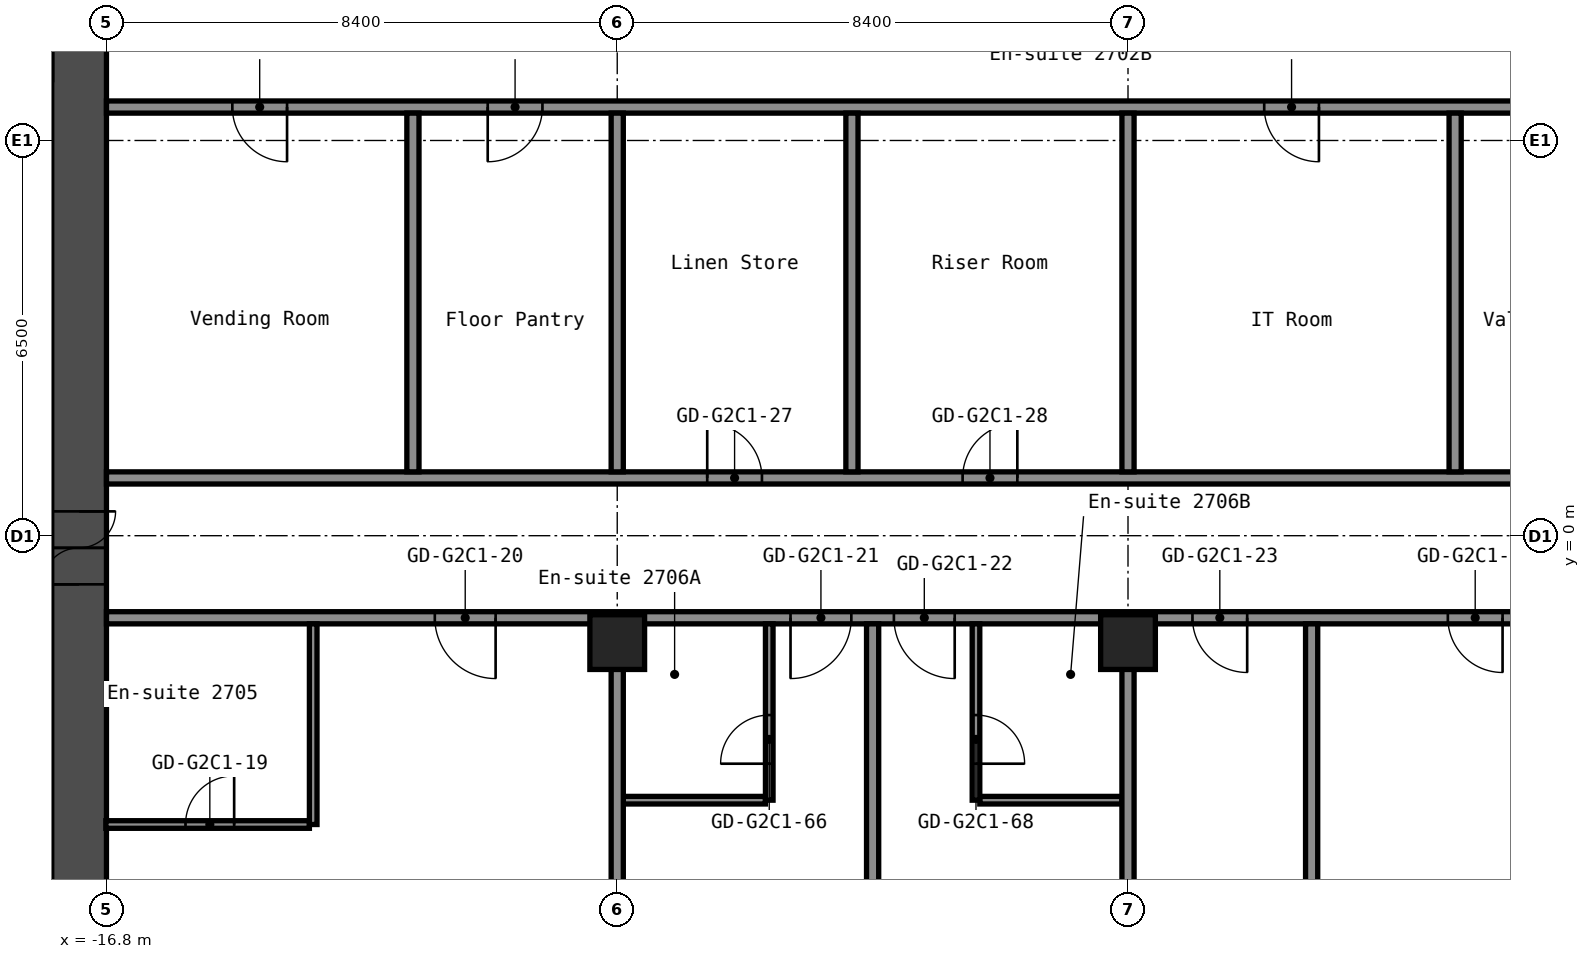
"""IFC4 building model, lengths in metres.
Left out: names, types, materials, properties, quantities, classifications, styles, units other than length and angle.
Written with IfcOpenShell. Run it as: python <this file> out.ifc"""

import sys

from ifc_helpers import new_model, si_unit, direction, frame, frame_2d, origin, origin_2d, place, context, subcontext, project, spatial, rectangle, hollow_rectangle, extrude, element, fill, save


model = new_model("IFC4")
c1 = context("Model", 3, precision=1e-05, world=origin(), true_north=direction((0.0, 1.0)))
c2 = subcontext(c1, "Body", "Model", "MODEL_VIEW")
j1 = project(units=[si_unit("LENGTHUNIT", "METRE"), si_unit("PLANEANGLEUNIT", "RADIAN")], contexts=[c1])
p1 = place(None, origin())
s1 = spatial("IfcSite", under=j1, at=p1, CompositionType="ELEMENT")
p2 = place(p1, origin())
s2 = spatial("IfcBuilding", under=s1, at=p2, CompositionType="ELEMENT")
p3 = place(p2, frame((0.0, 0.0, 97.8)))
s3 = spatial("IfcBuildingStorey", under=s2, at=p3, CompositionType="ELEMENT", Elevation=97.8)
for number, where, z_axis, x_axis in (
    (1, (-8.4, -1.75, 0.0), (0.0, 0.0, 1.0), (1.0, 0.0, 0.0)),
    (2, (0.0, -1.75, 0.0), (0.0, 0.0, 1.0), (1.0, 0.0, 0.0)),
):
    element("IfcColumn", number, at=place(p3, frame(where, z_axis=z_axis, x_axis=x_axis)), inside=s3, PredefinedType="COLUMN", context=c2, shape_type="SweptSolid", body=[
        extrude(hollow_rectangle(XDim=0.9, YDim=0.9, WallThickness=0.036, at=origin_2d()), origin(), (0.0, 0.0, 1.0), 2.8),
    ])
p4 = place(p3, frame((-17.25, -8.4, 0.0), z_axis=(0.0, 0.0, 1.0), x_axis=(0.0, 1.0, 0.0)))
e3 = element("IfcWall", 3, at=p4, inside=s3, PredefinedType="SHEAR", context=c2, shape_type="SweptSolid", body=[
    extrude(rectangle(XDim=16.8, YDim=0.9, at=frame_2d((8.4, 0.0))), origin(), (0.0, 0.0, 1.0), 2.8),
])
p5 = place(p4, frame((7.6, 0.0, 0.0)))
e4 = element("IfcOpeningElement", 4, at=p5, cuts=e3, PredefinedType="OPENING", context=c2, shape_type="SweptSolid", body=[
    extrude(rectangle(XDim=1.2, YDim=2.1, at=frame_2d((0.6, 1.05))), frame((0.0, 0.46, 0.0), z_axis=(0.0, -1.0, 0.0), x_axis=(1.0, 0.0, 0.0)), (0.0, 0.0, 1.0), 0.92),
])
p6 = place(p3, frame((-32.7, 7.95, 0.0), z_axis=(0.0, 0.0, 1.0), x_axis=(1.0, 0.0, 0.0)))
e5 = element("IfcWall", 5, at=p6, inside=s3, PredefinedType="SHEAR", context=c2, shape_type="SweptSolid", body=[
    extrude(rectangle(XDim=15.0, YDim=0.9, at=frame_2d((7.5, 0.0))), origin(), (0.0, 0.0, 1.0), 2.8),
])
p7 = place(p6, frame((3.4, 0.0, 0.0)))
e6 = element("IfcOpeningElement", 6, at=p7, cuts=e5, PredefinedType="OPENING", context=c2, shape_type="SweptSolid", body=[
    extrude(rectangle(XDim=1.2, YDim=2.1, at=frame_2d((0.6, 1.05))), frame((0.0, 0.46, 0.0), z_axis=(0.0, -1.0, 0.0), x_axis=(1.0, 0.0, 0.0)), (0.0, 0.0, 1.0), 0.92),
])
p8 = place(p6, frame((0.75, 0.0, 0.0)))
e7 = element("IfcOpeningElement", 7, at=p8, cuts=e5, PredefinedType="OPENING", context=c2, shape_type="SweptSolid", body=[
    extrude(rectangle(XDim=0.9, YDim=2.1, at=frame_2d((0.45, 1.05))), frame((0.0, 0.46, 0.0), z_axis=(0.0, -1.0, 0.0), x_axis=(1.0, 0.0, 0.0)), (0.0, 0.0, 1.0), 0.92),
])
p9 = place(p3, frame((-16.81, -4.75, 0.0), z_axis=(0.0, 0.0, 1.0), x_axis=(1.0, 0.0, 0.0)))
e8 = element("IfcWall", 8, at=p9, inside=s3, PredefinedType="PARTITIONING", context=c2, shape_type="SweptSolid", body=[
    extrude(rectangle(XDim=3.348, YDim=0.125, at=frame_2d((1.674, 0.0))), origin(), (0.0, 0.0, 1.0), 2.8),
])
p10 = place(p9, frame((1.31, 0.0, 0.0)))
e9 = element("IfcOpeningElement", 9, at=p10, cuts=e8, PredefinedType="OPENING", context=c2, shape_type="SweptSolid", body=[
    extrude(rectangle(XDim=0.8, YDim=2.1, at=frame_2d((0.4, 1.05))), frame((0.0, 0.073, 0.0), z_axis=(0.0, -1.0, 0.0), x_axis=(1.0, 0.0, 0.0)), (0.0, 0.0, 1.0), 0.145),
])
p11 = place(p3, frame((-8.3, -4.35, 0.0), z_axis=(0.0, 0.0, 1.0), x_axis=(1.0, 0.0, 0.0)))
e10 = element("IfcWall", 10, at=p11, inside=s3, PredefinedType="PARTITIONING", context=c2, shape_type="SweptSolid", body=[
    extrude(rectangle(XDim=2.338, YDim=0.125, at=frame_2d((1.169, 0.0))), origin(), (0.0, 0.0, 1.0), 2.8),
])
p12 = place(p3, frame((-2.438, -4.35, 0.0), z_axis=(0.0, 0.0, 1.0), x_axis=(1.0, 0.0, 0.0)))
e11 = element("IfcWall", 11, at=p12, inside=s3, PredefinedType="PARTITIONING", context=c2, shape_type="SweptSolid", body=[
    extrude(rectangle(XDim=2.337, YDim=0.125, at=frame_2d((1.169, 0.0))), origin(), (0.0, 0.0, 1.0), 2.8),
])
p13 = place(p3, frame((-16.8, -1.35, 0.0), z_axis=(0.0, 0.0, 1.0), x_axis=(1.0, 0.0, 0.0)))
e12 = element("IfcWall", 12, at=p13, inside=s3, PredefinedType="PARTITIONING", context=c2, shape_type="SweptSolid", body=[
    extrude(rectangle(XDim=33.6, YDim=0.2, at=frame_2d((16.8, 0.0))), origin(), (0.0, 0.0, 1.0), 2.8),
])
p14 = place(p13, frame((5.4, 0.0, 0.0)))
e13 = element("IfcOpeningElement", 13, at=p14, cuts=e12, PredefinedType="OPENING", context=c2, shape_type="SweptSolid", body=[
    extrude(rectangle(XDim=1.0, YDim=2.1, at=frame_2d((0.5, 1.05))), frame((0.0, 0.11, 0.0), z_axis=(0.0, -1.0, 0.0), x_axis=(1.0, 0.0, 0.0)), (0.0, 0.0, 1.0), 0.22),
])
p15 = place(p13, frame((11.25, 0.0, 0.0)))
e14 = element("IfcOpeningElement", 14, at=p15, cuts=e12, PredefinedType="OPENING", context=c2, shape_type="SweptSolid", body=[
    extrude(rectangle(XDim=1.0, YDim=2.1, at=frame_2d((0.5, 1.05))), frame((0.0, 0.11, 0.0), z_axis=(0.0, -1.0, 0.0), x_axis=(1.0, 0.0, 0.0)), (0.0, 0.0, 1.0), 0.22),
])
p16 = place(p13, frame((12.95, 0.0, 0.0)))
e15 = element("IfcOpeningElement", 15, at=p16, cuts=e12, PredefinedType="OPENING", context=c2, shape_type="SweptSolid", body=[
    extrude(rectangle(XDim=1.0, YDim=2.1, at=frame_2d((0.5, 1.05))), frame((0.0, 0.11, 0.0), z_axis=(0.0, -1.0, 0.0), x_axis=(1.0, 0.0, 0.0)), (0.0, 0.0, 1.0), 0.22),
])
p17 = place(p13, frame((17.86, 0.0, 0.0)))
e16 = element("IfcOpeningElement", 16, at=p17, cuts=e12, PredefinedType="OPENING", context=c2, shape_type="SweptSolid", body=[
    extrude(rectangle(XDim=0.9, YDim=2.1, at=frame_2d((0.45, 1.05))), frame((0.0, 0.11, 0.0), z_axis=(0.0, -1.0, 0.0), x_axis=(1.0, 0.0, 0.0)), (0.0, 0.0, 1.0), 0.22),
])
p18 = place(p13, frame((22.06, 0.0, 0.0)))
e17 = element("IfcOpeningElement", 17, at=p18, cuts=e12, PredefinedType="OPENING", context=c2, shape_type="SweptSolid", body=[
    extrude(rectangle(XDim=0.9, YDim=2.1, at=frame_2d((0.45, 1.05))), frame((0.0, 0.11, 0.0), z_axis=(0.0, -1.0, 0.0), x_axis=(1.0, 0.0, 0.0)), (0.0, 0.0, 1.0), 0.22),
])
p19 = place(p13, frame((28.05, 0.0, 0.0)))
e18 = element("IfcOpeningElement", 18, at=p19, cuts=e12, PredefinedType="OPENING", context=c2, shape_type="SweptSolid", body=[
    extrude(rectangle(XDim=1.0, YDim=2.1, at=frame_2d((0.5, 1.05))), frame((0.0, 0.11, 0.0), z_axis=(0.0, -1.0, 0.0), x_axis=(1.0, 0.0, 0.0)), (0.0, 0.0, 1.0), 0.22),
])
p20 = place(p13, frame((29.75, 0.0, 0.0)))
e19 = element("IfcOpeningElement", 19, at=p20, cuts=e12, PredefinedType="OPENING", context=c2, shape_type="SweptSolid", body=[
    extrude(rectangle(XDim=1.0, YDim=2.1, at=frame_2d((0.5, 1.05))), frame((0.0, 0.11, 0.0), z_axis=(0.0, -1.0, 0.0), x_axis=(1.0, 0.0, 0.0)), (0.0, 0.0, 1.0), 0.22),
])
p21 = place(p3, frame((-16.8, 0.95, 0.0), z_axis=(0.0, 0.0, 1.0), x_axis=(1.0, 0.0, 0.0)))
e20 = element("IfcWall", 20, at=p21, inside=s3, PredefinedType="PARTITIONING", context=c2, shape_type="SweptSolid", body=[
    extrude(rectangle(XDim=33.6, YDim=0.2, at=frame_2d((16.8, 0.0))), origin(), (0.0, 0.0, 1.0), 2.8),
])
p22 = place(p21, frame((9.88, 0.0, 0.0)))
e21 = element("IfcOpeningElement", 21, at=p22, cuts=e20, PredefinedType="OPENING", context=c2, shape_type="SweptSolid", body=[
    extrude(rectangle(XDim=0.9, YDim=2.1, at=frame_2d((0.45, 1.05))), frame((0.0, 0.11, 0.0), z_axis=(0.0, -1.0, 0.0), x_axis=(1.0, 0.0, 0.0)), (0.0, 0.0, 1.0), 0.22),
])
p23 = place(p21, frame((14.08, 0.0, 0.0)))
e22 = element("IfcOpeningElement", 22, at=p23, cuts=e20, PredefinedType="OPENING", context=c2, shape_type="SweptSolid", body=[
    extrude(rectangle(XDim=0.9, YDim=2.1, at=frame_2d((0.45, 1.05))), frame((0.0, 0.11, 0.0), z_axis=(0.0, -1.0, 0.0), x_axis=(1.0, 0.0, 0.0)), (0.0, 0.0, 1.0), 0.22),
])
p24 = place(p21, frame((27.185, 0.0, 0.0)))
e23 = element("IfcOpeningElement", 23, at=p24, cuts=e20, PredefinedType="OPENING", context=c2, shape_type="SweptSolid", body=[
    extrude(rectangle(XDim=0.9, YDim=2.1, at=frame_2d((0.45, 1.05))), frame((0.0, 0.11, 0.0), z_axis=(0.0, -1.0, 0.0), x_axis=(1.0, 0.0, 0.0)), (0.0, 0.0, 1.0), 0.22),
])
p25 = place(p21, frame((31.385, 0.0, 0.0)))
e24 = element("IfcOpeningElement", 24, at=p25, cuts=e20, PredefinedType="OPENING", context=c2, shape_type="SweptSolid", body=[
    extrude(rectangle(XDim=0.9, YDim=2.1, at=frame_2d((0.45, 1.05))), frame((0.0, 0.11, 0.0), z_axis=(0.0, -1.0, 0.0), x_axis=(1.0, 0.0, 0.0)), (0.0, 0.0, 1.0), 0.22),
])
p26 = place(p3, frame((-16.8, 7.05, 0.0), z_axis=(0.0, 0.0, 1.0), x_axis=(1.0, 0.0, 0.0)))
e25 = element("IfcWall", 25, at=p26, inside=s3, PredefinedType="PARTITIONING", context=c2, shape_type="SweptSolid", body=[
    extrude(rectangle(XDim=33.6, YDim=0.2, at=frame_2d((16.8, 0.0))), origin(), (0.0, 0.0, 1.0), 2.8),
])
p27 = place(p26, frame((2.07, 0.0, 0.0)))
e26 = element("IfcOpeningElement", 26, at=p27, cuts=e25, PredefinedType="OPENING", context=c2, shape_type="SweptSolid", body=[
    extrude(rectangle(XDim=0.9, YDim=2.1, at=frame_2d((0.45, 1.05))), frame((0.0, 0.11, 0.0), z_axis=(0.0, -1.0, 0.0), x_axis=(1.0, 0.0, 0.0)), (0.0, 0.0, 1.0), 0.22),
])
p28 = place(p26, frame((6.27, 0.0, 0.0)))
e27 = element("IfcOpeningElement", 27, at=p28, cuts=e25, PredefinedType="OPENING", context=c2, shape_type="SweptSolid", body=[
    extrude(rectangle(XDim=0.9, YDim=2.1, at=frame_2d((0.45, 1.05))), frame((0.0, 0.11, 0.0), z_axis=(0.0, -1.0, 0.0), x_axis=(1.0, 0.0, 0.0)), (0.0, 0.0, 1.0), 0.22),
])
p29 = place(p26, frame((19.04, 0.0, 0.0)))
e28 = element("IfcOpeningElement", 28, at=p29, cuts=e25, PredefinedType="OPENING", context=c2, shape_type="SweptSolid", body=[
    extrude(rectangle(XDim=0.9, YDim=2.1, at=frame_2d((0.45, 1.05))), frame((0.0, 0.11, 0.0), z_axis=(0.0, -1.0, 0.0), x_axis=(1.0, 0.0, 0.0)), (0.0, 0.0, 1.0), 0.22),
])
p30 = place(p26, frame((23.24, 0.0, 0.0)))
e29 = element("IfcOpeningElement", 29, at=p30, cuts=e25, PredefinedType="OPENING", context=c2, shape_type="SweptSolid", body=[
    extrude(rectangle(XDim=0.9, YDim=2.1, at=frame_2d((0.45, 1.05))), frame((0.0, 0.11, 0.0), z_axis=(0.0, -1.0, 0.0), x_axis=(1.0, 0.0, 0.0)), (0.0, 0.0, 1.0), 0.22),
])
p31 = place(p3, frame((-13.4, -4.75, 0.0), z_axis=(0.0, 0.0, 1.0), x_axis=(0.0, 1.0, 0.0)))
e30 = element("IfcWall", 30, at=p31, inside=s3, PredefinedType="PARTITIONING", context=c2, shape_type="SweptSolid", body=[
    extrude(rectangle(XDim=3.3, YDim=0.125, at=frame_2d((1.65, 0.0))), origin(), (0.0, 0.0, 1.0), 2.8),
])
p32 = place(p3, frame((-11.76, 1.05, 0.0), z_axis=(0.0, 0.0, 1.0), x_axis=(0.0, 1.0, 0.0)))
e31 = element("IfcWall", 31, at=p32, inside=s3, PredefinedType="PARTITIONING", context=c2, shape_type="SweptSolid", body=[
    extrude(rectangle(XDim=5.9, YDim=0.2, at=frame_2d((2.95, 0.0))), origin(), (0.0, 0.0, 1.0), 2.8),
])
p33 = place(p3, frame((-8.4, -15.55, 0.0), z_axis=(0.0, 0.0, 1.0), x_axis=(0.0, 1.0, 0.0)))
e32 = element("IfcWall", 32, at=p33, inside=s3, PredefinedType="PARTITIONING", context=c2, shape_type="SweptSolid", body=[
    extrude(rectangle(XDim=13.36, YDim=0.2, at=frame_2d((6.68, 0.0))), origin(), (0.0, 0.0, 1.0), 2.8),
])
p34 = place(p3, frame((-8.4, 1.05, 0.0), z_axis=(0.0, 0.0, 1.0), x_axis=(0.0, 1.0, 0.0)))
e33 = element("IfcWall", 33, at=p34, inside=s3, PredefinedType="PARTITIONING", context=c2, shape_type="SweptSolid", body=[
    extrude(rectangle(XDim=5.9, YDim=0.2, at=frame_2d((2.95, 0.0))), origin(), (0.0, 0.0, 1.0), 2.8),
])
p35 = place(p3, frame((-5.9, -4.35, 0.0), z_axis=(0.0, 0.0, 1.0), x_axis=(0.0, 1.0, 0.0)))
e34 = element("IfcWall", 34, at=p35, inside=s3, PredefinedType="PARTITIONING", context=c2, shape_type="SweptSolid", body=[
    extrude(rectangle(XDim=2.9, YDim=0.125, at=frame_2d((1.45, 0.0))), origin(), (0.0, 0.0, 1.0), 2.8),
])
p36 = place(p35, frame((0.6, 0.0, 0.0)))
e35 = element("IfcOpeningElement", 35, at=p36, cuts=e34, PredefinedType="OPENING", context=c2, shape_type="SweptSolid", body=[
    extrude(rectangle(XDim=0.8, YDim=2.1, at=frame_2d((0.4, 1.05))), frame((0.0, 0.073, 0.0), z_axis=(0.0, -1.0, 0.0), x_axis=(1.0, 0.0, 0.0)), (0.0, 0.0, 1.0), 0.145),
])
p37 = place(p3, frame((-4.54, 1.05, 0.0), z_axis=(0.0, 0.0, 1.0), x_axis=(0.0, 1.0, 0.0)))
e36 = element("IfcWall", 36, at=p37, inside=s3, PredefinedType="PARTITIONING", context=c2, shape_type="SweptSolid", body=[
    extrude(rectangle(XDim=5.9, YDim=0.2, at=frame_2d((2.95, 0.0))), origin(), (0.0, 0.0, 1.0), 2.8),
])
p38 = place(p3, frame((-4.2, -15.55, 0.0), z_axis=(0.0, 0.0, 1.0), x_axis=(0.0, 1.0, 0.0)))
e37 = element("IfcWall", 37, at=p38, inside=s3, PredefinedType="PARTITIONING", context=c2, shape_type="SweptSolid", body=[
    extrude(rectangle(XDim=14.1, YDim=0.2, at=frame_2d((7.05, 0.0))), origin(), (0.0, 0.0, 1.0), 2.8),
])
p39 = place(p3, frame((-2.5, -4.35, 0.0), z_axis=(0.0, 0.0, 1.0), x_axis=(0.0, 1.0, 0.0)))
e38 = element("IfcWall", 38, at=p39, inside=s3, PredefinedType="PARTITIONING", context=c2, shape_type="SweptSolid", body=[
    extrude(rectangle(XDim=2.9, YDim=0.125, at=frame_2d((1.45, 0.0))), origin(), (0.0, 0.0, 1.0), 2.8),
])
p40 = place(p39, frame((0.6, 0.0, 0.0)))
e39 = element("IfcOpeningElement", 39, at=p40, cuts=e38, PredefinedType="OPENING", context=c2, shape_type="SweptSolid", body=[
    extrude(rectangle(XDim=0.8, YDim=2.1, at=frame_2d((0.4, 1.05))), frame((0.0, 0.073, 0.0), z_axis=(0.0, -1.0, 0.0), x_axis=(1.0, 0.0, 0.0)), (0.0, 0.0, 1.0), 0.145),
])
p41 = place(p3, frame((0.0, -15.55, 0.0), z_axis=(0.0, 0.0, 1.0), x_axis=(0.0, 1.0, 0.0)))
e40 = element("IfcWall", 40, at=p41, inside=s3, PredefinedType="PARTITIONING", context=c2, shape_type="SweptSolid", body=[
    extrude(rectangle(XDim=13.36, YDim=0.2, at=frame_2d((6.68, 0.0))), origin(), (0.0, 0.0, 1.0), 2.8),
])
p42 = place(p3, frame((0.0, 1.05, 0.0), z_axis=(0.0, 0.0, 1.0), x_axis=(0.0, 1.0, 0.0)))
e41 = element("IfcWall", 41, at=p42, inside=s3, PredefinedType="PARTITIONING", context=c2, shape_type="SweptSolid", body=[
    extrude(rectangle(XDim=5.9, YDim=0.2, at=frame_2d((2.95, 0.0))), origin(), (0.0, 0.0, 1.0), 2.8),
])
p43 = place(p3, frame((3.02, -15.55, 0.0), z_axis=(0.0, 0.0, 1.0), x_axis=(0.0, 1.0, 0.0)))
e42 = element("IfcWall", 42, at=p43, inside=s3, PredefinedType="PARTITIONING", context=c2, shape_type="SweptSolid", body=[
    extrude(rectangle(XDim=14.1, YDim=0.2, at=frame_2d((7.05, 0.0))), origin(), (0.0, 0.0, 1.0), 2.8),
])
p44 = place(p3, frame((5.38, 1.05, 0.0), z_axis=(0.0, 0.0, 1.0), x_axis=(0.0, 1.0, 0.0)))
e43 = element("IfcWall", 43, at=p44, inside=s3, PredefinedType="PARTITIONING", context=c2, shape_type="SweptSolid", body=[
    extrude(rectangle(XDim=5.9, YDim=0.2, at=frame_2d((2.95, 0.0))), origin(), (0.0, 0.0, 1.0), 2.8),
])
p45 = place(p5, origin())
e44 = element("IfcDoor", 44, at=p45, inside=s3, OperationType="DOUBLE_DOOR_SINGLE_SWING", PredefinedType="DOOR", context=c2, shape_type="SweptSolid", body=[
    extrude(rectangle(XDim=1.2, YDim=2.1, at=frame_2d((0.6, 1.05))), frame((0.0, 0.025, 0.0), z_axis=(0.0, -1.0, 0.0), x_axis=(1.0, 0.0, 0.0)), (0.0, 0.0, 1.0), 0.05),
])
fill(e4, e44)
p46 = place(p10, origin())
e45 = element("IfcDoor", 45, at=p46, inside=s3, OperationType="SINGLE_SWING_LEFT", PredefinedType="DOOR", context=c2, shape_type="SweptSolid", body=[
    extrude(rectangle(XDim=0.8, YDim=2.1, at=frame_2d((0.4, 1.05))), frame((0.0, 0.025, 0.0), z_axis=(0.0, -1.0, 0.0), x_axis=(1.0, 0.0, 0.0)), (0.0, 0.0, 1.0), 0.05),
])
fill(e9, e45)
p47 = place(p14, origin())
e46 = element("IfcDoor", 46, at=p47, inside=s3, OperationType="SINGLE_SWING_RIGHT", PredefinedType="DOOR", context=c2, shape_type="SweptSolid", body=[
    extrude(rectangle(XDim=1.0, YDim=2.1, at=frame_2d((0.5, 1.05))), frame((0.0, 0.025, 0.0), z_axis=(0.0, -1.0, 0.0), x_axis=(1.0, 0.0, 0.0)), (0.0, 0.0, 1.0), 0.05),
])
fill(e13, e46)
p48 = place(p15, origin())
e47 = element("IfcDoor", 47, at=p48, inside=s3, OperationType="SINGLE_SWING_LEFT", PredefinedType="DOOR", context=c2, shape_type="SweptSolid", body=[
    extrude(rectangle(XDim=1.0, YDim=2.1, at=frame_2d((0.5, 1.05))), frame((0.0, 0.025, 0.0), z_axis=(0.0, -1.0, 0.0), x_axis=(1.0, 0.0, 0.0)), (0.0, 0.0, 1.0), 0.05),
])
fill(e14, e47)
p49 = place(p16, origin())
e48 = element("IfcDoor", 48, at=p49, inside=s3, OperationType="SINGLE_SWING_RIGHT", PredefinedType="DOOR", context=c2, shape_type="SweptSolid", body=[
    extrude(rectangle(XDim=1.0, YDim=2.1, at=frame_2d((0.5, 1.05))), frame((0.0, 0.025, 0.0), z_axis=(0.0, -1.0, 0.0), x_axis=(1.0, 0.0, 0.0)), (0.0, 0.0, 1.0), 0.05),
])
fill(e15, e48)
p50 = place(p17, origin())
e49 = element("IfcDoor", 49, at=p50, inside=s3, OperationType="SINGLE_SWING_RIGHT", PredefinedType="DOOR", context=c2, shape_type="SweptSolid", body=[
    extrude(rectangle(XDim=0.9, YDim=2.1, at=frame_2d((0.45, 1.05))), frame((0.0, 0.025, 0.0), z_axis=(0.0, -1.0, 0.0), x_axis=(1.0, 0.0, 0.0)), (0.0, 0.0, 1.0), 0.05),
])
fill(e16, e49)
p51 = place(p18, origin())
e50 = element("IfcDoor", 50, at=p51, inside=s3, OperationType="SINGLE_SWING_RIGHT", PredefinedType="DOOR", context=c2, shape_type="SweptSolid", body=[
    extrude(rectangle(XDim=0.9, YDim=2.1, at=frame_2d((0.45, 1.05))), frame((0.0, 0.025, 0.0), z_axis=(0.0, -1.0, 0.0), x_axis=(1.0, 0.0, 0.0)), (0.0, 0.0, 1.0), 0.05),
])
fill(e17, e50)
p52 = place(p22, origin())
e51 = element("IfcDoor", 51, at=p52, inside=s3, OperationType="SINGLE_SWING_RIGHT", PredefinedType="DOOR", context=c2, shape_type="SweptSolid", body=[
    extrude(rectangle(XDim=0.9, YDim=2.1, at=frame_2d((0.45, 1.05))), frame((0.0, 0.025, 0.0), z_axis=(0.0, -1.0, 0.0), x_axis=(1.0, 0.0, 0.0)), (0.0, 0.0, 1.0), 0.05),
])
fill(e21, e51)
p53 = place(p23, origin())
e52 = element("IfcDoor", 52, at=p53, inside=s3, OperationType="SINGLE_SWING_LEFT", PredefinedType="DOOR", context=c2, shape_type="SweptSolid", body=[
    extrude(rectangle(XDim=0.9, YDim=2.1, at=frame_2d((0.45, 1.05))), frame((0.0, 0.025, 0.0), z_axis=(0.0, -1.0, 0.0), x_axis=(1.0, 0.0, 0.0)), (0.0, 0.0, 1.0), 0.05),
])
fill(e22, e52)
p54 = place(p27, origin())
e53 = element("IfcDoor", 53, at=p54, inside=s3, OperationType="SINGLE_SWING_RIGHT", PredefinedType="DOOR", context=c2, shape_type="SweptSolid", body=[
    extrude(rectangle(XDim=0.9, YDim=2.1, at=frame_2d((0.45, 1.05))), frame((0.0, 0.025, 0.0), z_axis=(0.0, -1.0, 0.0), x_axis=(1.0, 0.0, 0.0)), (0.0, 0.0, 1.0), 0.05),
])
fill(e26, e53)
p55 = place(p28, origin())
e54 = element("IfcDoor", 54, at=p55, inside=s3, OperationType="SINGLE_SWING_LEFT", PredefinedType="DOOR", context=c2, shape_type="SweptSolid", body=[
    extrude(rectangle(XDim=0.9, YDim=2.1, at=frame_2d((0.45, 1.05))), frame((0.0, 0.025, 0.0), z_axis=(0.0, -1.0, 0.0), x_axis=(1.0, 0.0, 0.0)), (0.0, 0.0, 1.0), 0.05),
])
fill(e27, e54)
p56 = place(p29, origin())
e55 = element("IfcDoor", 55, at=p56, inside=s3, OperationType="SINGLE_SWING_RIGHT", PredefinedType="DOOR", context=c2, shape_type="SweptSolid", body=[
    extrude(rectangle(XDim=0.9, YDim=2.1, at=frame_2d((0.45, 1.05))), frame((0.0, 0.025, 0.0), z_axis=(0.0, -1.0, 0.0), x_axis=(1.0, 0.0, 0.0)), (0.0, 0.0, 1.0), 0.05),
])
fill(e28, e55)
p57 = place(p36, origin())
e56 = element("IfcDoor", 56, at=p57, inside=s3, OperationType="SINGLE_SWING_RIGHT", PredefinedType="DOOR", context=c2, shape_type="SweptSolid", body=[
    extrude(rectangle(XDim=0.8, YDim=2.1, at=frame_2d((0.4, 1.05))), frame((0.0, 0.025, 0.0), z_axis=(0.0, -1.0, 0.0), x_axis=(1.0, 0.0, 0.0)), (0.0, 0.0, 1.0), 0.05),
])
fill(e35, e56)
p58 = place(p40, origin())
e57 = element("IfcDoor", 57, at=p58, inside=s3, OperationType="SINGLE_SWING_LEFT", PredefinedType="DOOR", context=c2, shape_type="SweptSolid", body=[
    extrude(rectangle(XDim=0.8, YDim=2.1, at=frame_2d((0.4, 1.05))), frame((0.0, 0.025, 0.0), z_axis=(0.0, -1.0, 0.0), x_axis=(1.0, 0.0, 0.0)), (0.0, 0.0, 1.0), 0.05),
])
fill(e39, e57)
save(model, sys.argv[1])
